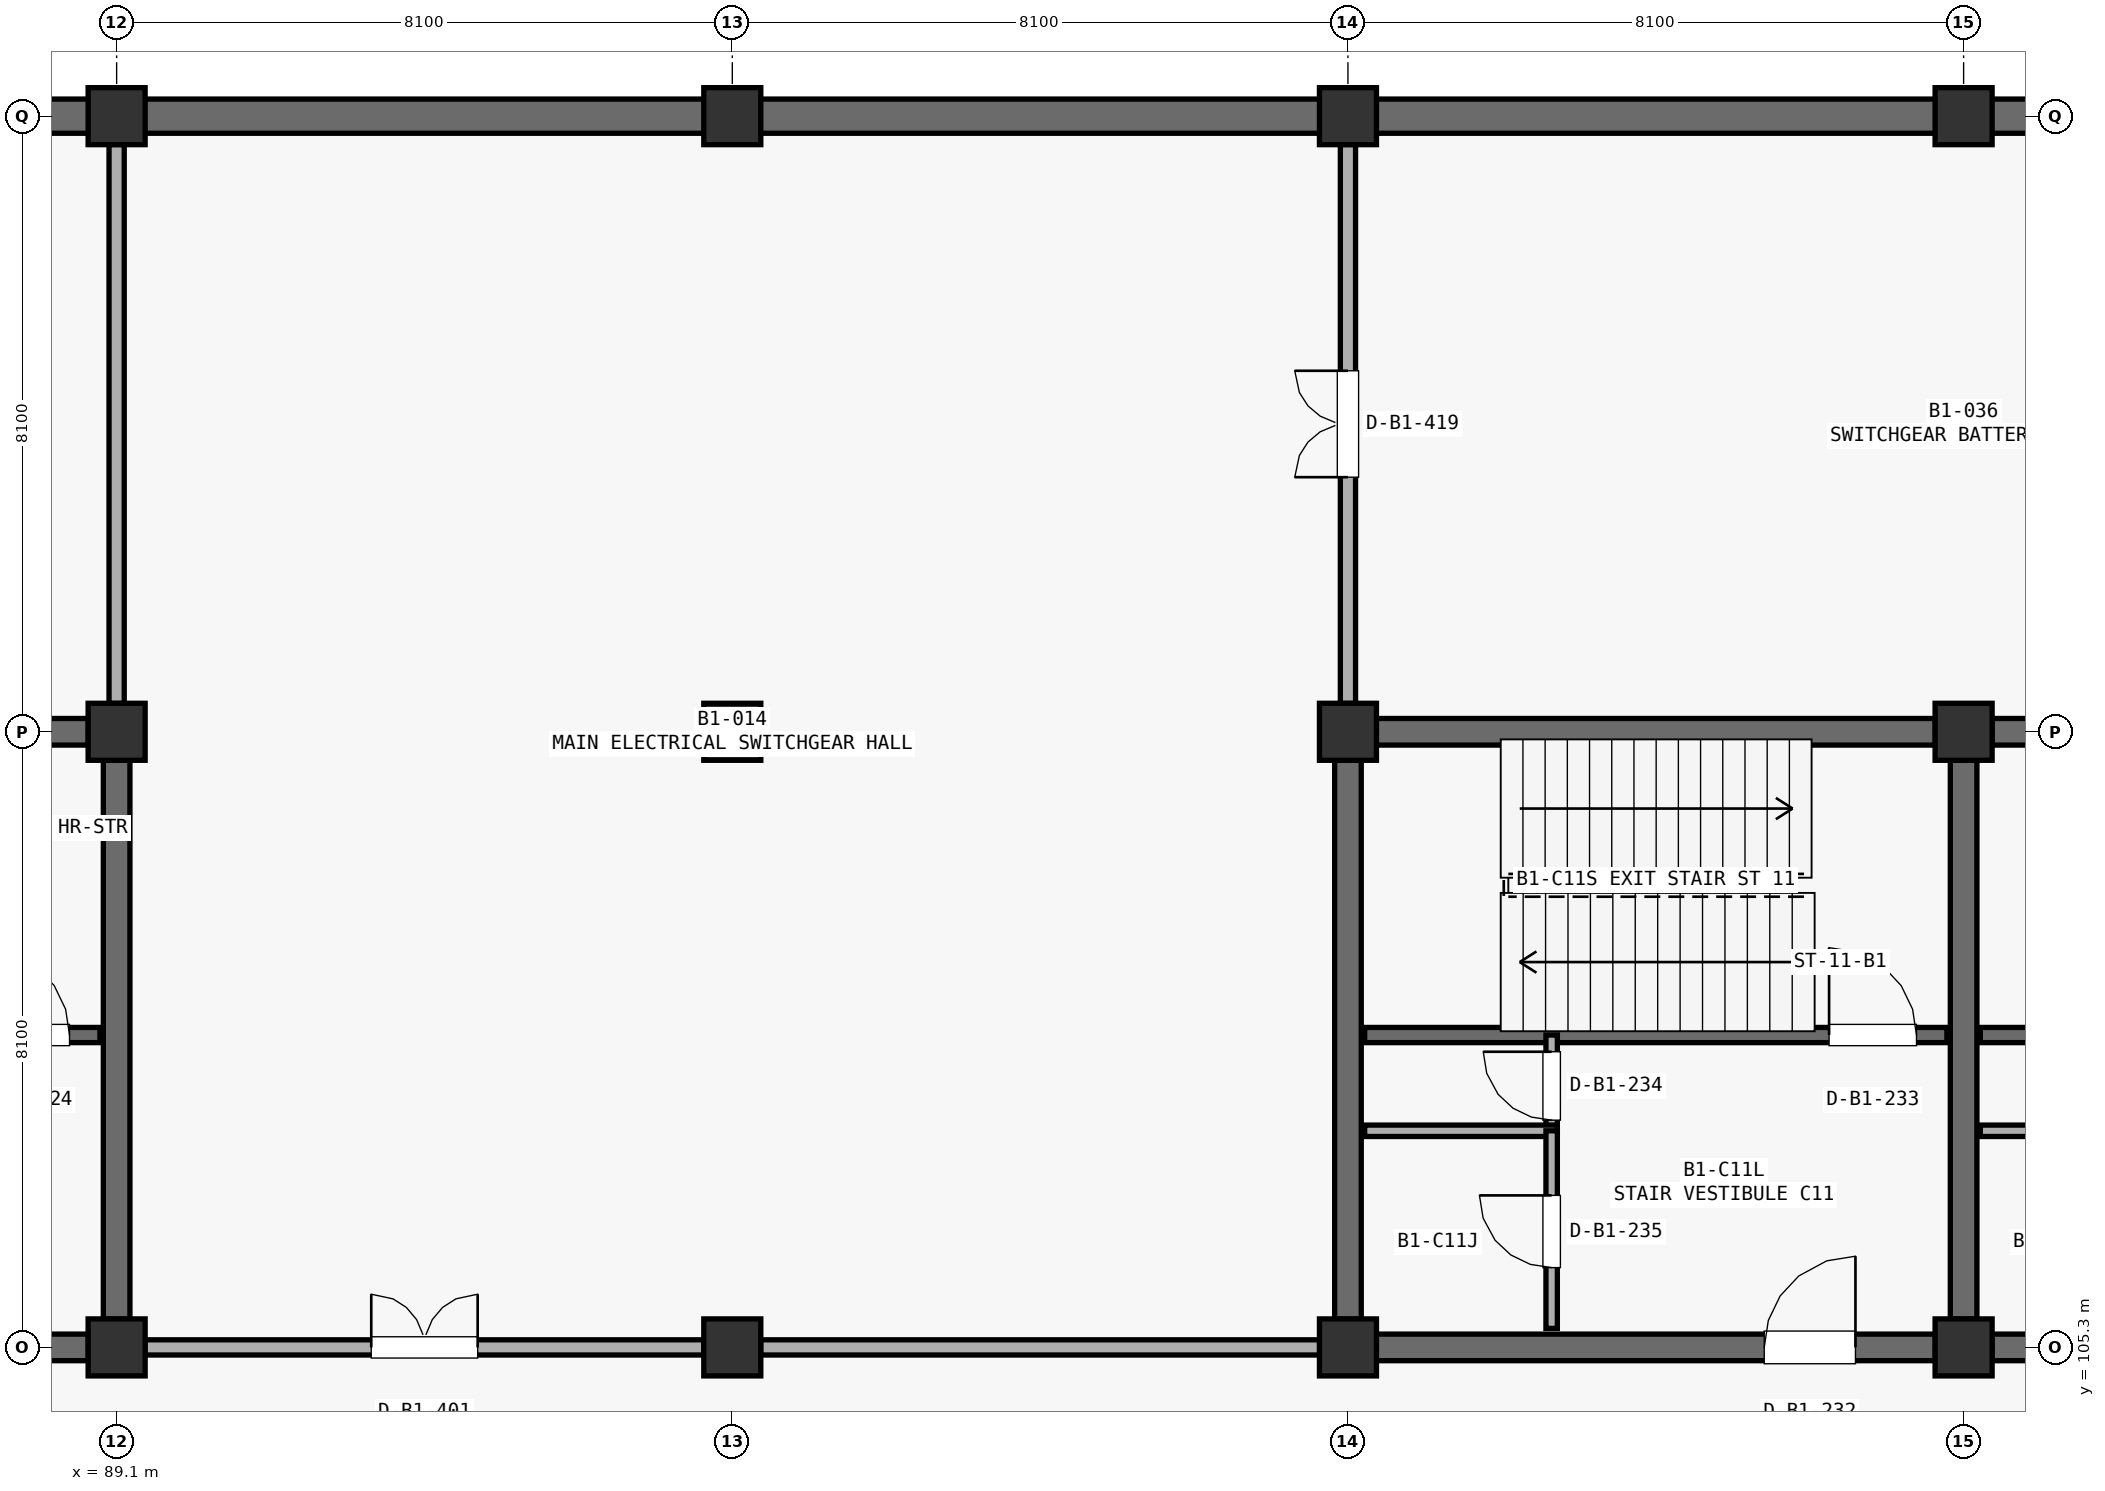
"""IFC4 building model, lengths in metres.
Left out: names, types, materials, properties, quantities, classifications, styles, units other than length and angle.
Written with IfcOpenShell. Run it as: python <this file> out.ifc"""

import sys

from ifc_helpers import new_model, si_unit, direction, frame, frame_2d, origin, origin_2d, place, context, subcontext, project, spatial, rectangle, extrude, element, fill, save


model = new_model("IFC4")
c1 = context("Model", 3, precision=1e-05, world=origin(), true_north=direction((0.0, 1.0)))
c2 = subcontext(c1, "Body", "Model", "MODEL_VIEW")
j1 = project(units=[si_unit("LENGTHUNIT", "METRE"), si_unit("PLANEANGLEUNIT", "RADIAN")], contexts=[c1])
p1 = place(None, origin())
s1 = spatial("IfcSite", under=j1, at=p1, CompositionType="ELEMENT")
p2 = place(p1, origin())
s2 = spatial("IfcBuilding", under=s1, at=p2, CompositionType="ELEMENT")
p3 = place(p2, frame((0.0, 0.0, -5.1)))
s3 = spatial("IfcBuildingStorey", under=s2, at=p3, CompositionType="ELEMENT", Elevation=-5.1)
for number, where, z_axis, x_axis in (
    (1, (89.1, 105.3, 0.0), (0.0, 0.0, 1.0), (1.0, 0.0, 0.0)),
    (2, (89.1, 113.4, 0.0), (0.0, 0.0, 1.0), (1.0, 0.0, 0.0)),
    (3, (89.1, 121.5, 0.0), (0.0, 0.0, 1.0), (1.0, 0.0, 0.0)),
    (4, (97.2, 105.3, 0.0), (0.0, 0.0, 1.0), (1.0, 0.0, 0.0)),
    (5, (97.2, 113.4, 0.0), (0.0, 0.0, 1.0), (1.0, 0.0, 0.0)),
    (6, (97.2, 121.5, 0.0), (0.0, 0.0, 1.0), (1.0, 0.0, 0.0)),
    (7, (105.3, 105.3, 0.0), (0.0, 0.0, 1.0), (1.0, 0.0, 0.0)),
    (8, (105.3, 113.4, 0.0), (0.0, 0.0, 1.0), (1.0, 0.0, 0.0)),
    (9, (105.3, 121.5, 0.0), (0.0, 0.0, 1.0), (1.0, 0.0, 0.0)),
    (10, (113.4, 105.3, 0.0), (0.0, 0.0, 1.0), (1.0, 0.0, 0.0)),
    (11, (113.4, 113.4, 0.0), (0.0, 0.0, 1.0), (1.0, 0.0, 0.0)),
    (12, (113.4, 121.5, 0.0), (0.0, 0.0, 1.0), (1.0, 0.0, 0.0)),
):
    element("IfcColumn", number, at=place(p3, frame(where, z_axis=z_axis, x_axis=x_axis)), inside=s3, PredefinedType="COLUMN", context=c2, shape_type="SweptSolid", body=[
        extrude(rectangle(XDim=0.75, YDim=0.75, at=origin_2d()), origin(), (0.0, 0.0, 1.0), 5.1),
    ])
p4 = place(p3, frame((81.36, 121.5, 0.0), z_axis=(0.0, 0.0, 1.0), x_axis=(1.0, 0.0, 0.0)))
e13 = element("IfcWall", 13, at=p4, inside=s3, PredefinedType="SOLIDWALL", context=c2, shape_type="SweptSolid", body=[
    extrude(rectangle(XDim=7.38, YDim=0.45, at=frame_2d((3.69, 0.0))), origin(), (0.0, 0.0, 1.0), 4.03),
])
p5 = place(p3, frame((89.46, 121.5, 0.0), z_axis=(0.0, 0.0, 1.0), x_axis=(1.0, 0.0, 0.0)))
e14 = element("IfcWall", 14, at=p5, inside=s3, PredefinedType="SOLIDWALL", context=c2, shape_type="SweptSolid", body=[
    extrude(rectangle(XDim=7.38, YDim=0.45, at=frame_2d((3.69, 0.0))), origin(), (0.0, 0.0, 1.0), 4.13),
])
p6 = place(p3, frame((97.56, 121.5, 0.0), z_axis=(0.0, 0.0, 1.0), x_axis=(1.0, 0.0, 0.0)))
e15 = element("IfcWall", 15, at=p6, inside=s3, PredefinedType="SOLIDWALL", context=c2, shape_type="SweptSolid", body=[
    extrude(rectangle(XDim=7.38, YDim=0.45, at=frame_2d((3.69, 0.0))), origin(), (0.0, 0.0, 1.0), 4.13),
])
p7 = place(p3, frame((105.66, 121.5, 0.0), z_axis=(0.0, 0.0, 1.0), x_axis=(1.0, 0.0, 0.0)))
e16 = element("IfcWall", 16, at=p7, inside=s3, PredefinedType="SOLIDWALL", context=c2, shape_type="SweptSolid", body=[
    extrude(rectangle(XDim=7.38, YDim=0.45, at=frame_2d((3.69, 0.0))), origin(), (0.0, 0.0, 1.0), 3.93),
])
p8 = place(p3, frame((113.76, 121.5, 0.0), z_axis=(0.0, 0.0, 1.0), x_axis=(1.0, 0.0, 0.0)))
e17 = element("IfcWall", 17, at=p8, inside=s3, PredefinedType="SOLIDWALL", context=c2, shape_type="SweptSolid", body=[
    extrude(rectangle(XDim=7.38, YDim=0.45, at=frame_2d((3.69, 0.0))), origin(), (0.0, 0.0, 1.0), 3.83),
])
for number, where, z_axis, x_axis in (
    (18, (81.373, 113.4, 0.0), (0.0, 0.0, 1.0), (1.0, 0.0, 0.0)),
    (19, (89.1, 105.673, 0.0), (0.0, 0.0, 1.0), (0.0, 1.0, 0.0)),
):
    element("IfcWall", number, at=place(p3, frame(where, z_axis=z_axis, x_axis=x_axis)), inside=s3, PredefinedType="SHEAR", context=c2, shape_type="SweptSolid", body=[
        extrude(rectangle(XDim=7.354, YDim=0.35, at=frame_2d((3.677, 0.0))), origin(), (0.0, 0.0, 1.0), 4.782),
    ])
p9 = place(p3, frame((81.373, 105.3, 0.0), z_axis=(0.0, 0.0, 1.0), x_axis=(1.0, 0.0, 0.0)))
e20 = element("IfcWall", 20, at=p9, inside=s3, PredefinedType="SHEAR", context=c2, shape_type="SweptSolid", body=[
    extrude(rectangle(XDim=7.354, YDim=0.35, at=frame_2d((3.677, 0.0))), origin(), (0.0, 0.0, 1.0), 4.782),
])
p10 = place(p9, frame((5.104, 0.0, 0.0)))
e21 = element("IfcOpeningElement", 21, at=p10, cuts=e20, PredefinedType="OPENING", context=c2, shape_type="SweptSolid", body=[
    extrude(rectangle(XDim=1.2, YDim=2.2, at=frame_2d((0.6, 1.1))), frame((0.0, 0.185, 0.0), z_axis=(0.0, -1.0, 0.0), x_axis=(1.0, 0.0, 0.0)), (0.0, 0.0, 1.0), 0.37),
])
p11 = place(p3, frame((81.22, 109.41, 0.0), z_axis=(0.0, 0.0, 1.0), x_axis=(1.0, 0.0, 0.0)))
e22 = element("IfcWall", 22, at=p11, inside=s3, PredefinedType="SHEAR", context=c2, shape_type="SweptSolid", body=[
    extrude(rectangle(XDim=7.66, YDim=0.2, at=frame_2d((3.83, 0.0))), origin(), (0.0, 0.0, 1.0), 4.782),
])
p12 = place(p11, frame((6.11, 0.0, 0.0)))
e23 = element("IfcOpeningElement", 23, at=p12, cuts=e22, PredefinedType="OPENING", context=c2, shape_type="SweptSolid", body=[
    extrude(rectangle(XDim=1.15, YDim=2.2, at=frame_2d((0.575, 1.1))), frame((0.0, 0.11, 0.0), z_axis=(0.0, -1.0, 0.0), x_axis=(1.0, 0.0, 0.0)), (0.0, 0.0, 1.0), 0.22),
])
for number, where, z_axis, x_axis in (
    (24, (113.773, 113.4, 0.0), (0.0, 0.0, 1.0), (1.0, 0.0, 0.0)),
    (25, (113.4, 105.673, 0.0), (0.0, 0.0, 1.0), (0.0, 1.0, 0.0)),
):
    element("IfcWall", number, at=place(p3, frame(where, z_axis=z_axis, x_axis=x_axis)), inside=s3, PredefinedType="SHEAR", context=c2, shape_type="SweptSolid", body=[
        extrude(rectangle(XDim=7.354, YDim=0.35, at=frame_2d((3.677, 0.0))), origin(), (0.0, 0.0, 1.0), 4.782),
    ])
p13 = place(p3, frame((113.773, 105.3, 0.0), z_axis=(0.0, 0.0, 1.0), x_axis=(1.0, 0.0, 0.0)))
e26 = element("IfcWall", 26, at=p13, inside=s3, PredefinedType="SHEAR", context=c2, shape_type="SweptSolid", body=[
    extrude(rectangle(XDim=7.354, YDim=0.35, at=frame_2d((3.677, 0.0))), origin(), (0.0, 0.0, 1.0), 4.782),
])
p14 = place(p13, frame((5.104, 0.0, 0.0)))
e27 = element("IfcOpeningElement", 27, at=p14, cuts=e26, PredefinedType="OPENING", context=c2, shape_type="SweptSolid", body=[
    extrude(rectangle(XDim=1.2, YDim=2.2, at=frame_2d((0.6, 1.1))), frame((0.0, 0.185, 0.0), z_axis=(0.0, -1.0, 0.0), x_axis=(1.0, 0.0, 0.0)), (0.0, 0.0, 1.0), 0.37),
])
p15 = place(p3, frame((113.62, 109.41, 0.0), z_axis=(0.0, 0.0, 1.0), x_axis=(1.0, 0.0, 0.0)))
e28 = element("IfcWall", 28, at=p15, inside=s3, PredefinedType="SHEAR", context=c2, shape_type="SweptSolid", body=[
    extrude(rectangle(XDim=7.66, YDim=0.2, at=frame_2d((3.83, 0.0))), origin(), (0.0, 0.0, 1.0), 4.782),
])
p16 = place(p15, frame((6.11, 0.0, 0.0)))
e29 = element("IfcOpeningElement", 29, at=p16, cuts=e28, PredefinedType="OPENING", context=c2, shape_type="SweptSolid", body=[
    extrude(rectangle(XDim=1.15, YDim=2.2, at=frame_2d((0.575, 1.1))), frame((0.0, 0.11, 0.0), z_axis=(0.0, -1.0, 0.0), x_axis=(1.0, 0.0, 0.0)), (0.0, 0.0, 1.0), 0.22),
])
p17 = place(p3, frame((113.62, 108.15, 0.0), z_axis=(0.0, 0.0, 1.0), x_axis=(1.0, 0.0, 0.0)))
e30 = element("IfcWall", 30, at=p17, inside=s3, PredefinedType="PARTITIONING", context=c2, shape_type="SweptSolid", body=[
    extrude(rectangle(XDim=2.53, YDim=0.15, at=frame_2d((1.265, 0.0))), origin(), (0.0, 0.0, 1.0), 4.782),
])
for number, where, z_axis, x_axis in (
    (31, (105.673, 113.4, 0.0), (0.0, 0.0, 1.0), (1.0, 0.0, 0.0)),
    (32, (105.3, 105.673, 0.0), (0.0, 0.0, 1.0), (0.0, 1.0, 0.0)),
):
    element("IfcWall", number, at=place(p3, frame(where, z_axis=z_axis, x_axis=x_axis)), inside=s3, PredefinedType="SHEAR", context=c2, shape_type="SweptSolid", body=[
        extrude(rectangle(XDim=7.354, YDim=0.35, at=frame_2d((3.677, 0.0))), origin(), (0.0, 0.0, 1.0), 4.782),
    ])
p18 = place(p3, frame((105.673, 105.3, 0.0), z_axis=(0.0, 0.0, 1.0), x_axis=(1.0, 0.0, 0.0)))
e33 = element("IfcWall", 33, at=p18, inside=s3, PredefinedType="SHEAR", context=c2, shape_type="SweptSolid", body=[
    extrude(rectangle(XDim=7.354, YDim=0.35, at=frame_2d((3.677, 0.0))), origin(), (0.0, 0.0, 1.0), 4.782),
])
p19 = place(p18, frame((5.104, 0.0, 0.0)))
e34 = element("IfcOpeningElement", 34, at=p19, cuts=e33, PredefinedType="OPENING", context=c2, shape_type="SweptSolid", body=[
    extrude(rectangle(XDim=1.2, YDim=2.2, at=frame_2d((0.6, 1.1))), frame((0.0, 0.185, 0.0), z_axis=(0.0, -1.0, 0.0), x_axis=(1.0, 0.0, 0.0)), (0.0, 0.0, 1.0), 0.37),
])
p20 = place(p3, frame((105.52, 109.41, 0.0), z_axis=(0.0, 0.0, 1.0), x_axis=(1.0, 0.0, 0.0)))
e35 = element("IfcWall", 35, at=p20, inside=s3, PredefinedType="SHEAR", context=c2, shape_type="SweptSolid", body=[
    extrude(rectangle(XDim=7.66, YDim=0.2, at=frame_2d((3.83, 0.0))), origin(), (0.0, 0.0, 1.0), 4.782),
])
p21 = place(p20, frame((6.11, 0.0, 0.0)))
e36 = element("IfcOpeningElement", 36, at=p21, cuts=e35, PredefinedType="OPENING", context=c2, shape_type="SweptSolid", body=[
    extrude(rectangle(XDim=1.15, YDim=2.2, at=frame_2d((0.575, 1.1))), frame((0.0, 0.11, 0.0), z_axis=(0.0, -1.0, 0.0), x_axis=(1.0, 0.0, 0.0)), (0.0, 0.0, 1.0), 0.22),
])
p22 = place(p3, frame((107.98, 108.15, 0.0), z_axis=(0.0, 0.0, 1.0), x_axis=(0.0, 1.0, 0.0)))
e37 = element("IfcWall", 37, at=p22, inside=s3, PredefinedType="PARTITIONING", context=c2, shape_type="SweptSolid", body=[
    extrude(rectangle(XDim=1.26, YDim=0.15, at=frame_2d((0.63, 0.0))), origin(), (0.0, 0.0, 1.0), 4.782),
])
p23 = place(p22, frame((0.14, 0.0, 0.0)))
e38 = element("IfcOpeningElement", 38, at=p23, cuts=e37, PredefinedType="OPENING", context=c2, shape_type="SweptSolid", body=[
    extrude(rectangle(XDim=0.9, YDim=2.15, at=frame_2d((0.45, 1.075))), frame((0.0, 0.085, 0.0), z_axis=(0.0, -1.0, 0.0), x_axis=(1.0, 0.0, 0.0)), (0.0, 0.0, 1.0), 0.17),
])
p24 = place(p3, frame((105.52, 108.15, 0.0), z_axis=(0.0, 0.0, 1.0), x_axis=(1.0, 0.0, 0.0)))
e39 = element("IfcWall", 39, at=p24, inside=s3, PredefinedType="PARTITIONING", context=c2, shape_type="SweptSolid", body=[
    extrude(rectangle(XDim=2.53, YDim=0.15, at=frame_2d((1.265, 0.0))), origin(), (0.0, 0.0, 1.0), 4.782),
])
p25 = place(p3, frame((107.98, 105.55, 0.0), z_axis=(0.0, 0.0, 1.0), x_axis=(0.0, 1.0, 0.0)))
e40 = element("IfcWall", 40, at=p25, inside=s3, PredefinedType="PARTITIONING", context=c2, shape_type="SweptSolid", body=[
    extrude(rectangle(XDim=2.6, YDim=0.15, at=frame_2d((1.3, 0.0))), origin(), (0.0, 0.0, 1.0), 4.782),
])
p26 = place(p25, frame((0.8, 0.0, 0.0)))
e41 = element("IfcOpeningElement", 41, at=p26, cuts=e40, PredefinedType="OPENING", context=c2, shape_type="SweptSolid", body=[
    extrude(rectangle(XDim=0.95, YDim=2.15, at=frame_2d((0.475, 1.075))), frame((0.0, 0.085, 0.0), z_axis=(0.0, -1.0, 0.0), x_axis=(1.0, 0.0, 0.0)), (0.0, 0.0, 1.0), 0.17),
])
p27 = place(p3, frame((89.473, 105.3, 0.0), z_axis=(0.0, 0.0, 1.0), x_axis=(1.0, 0.0, 0.0)))
e42 = element("IfcWall", 42, at=p27, inside=s3, PredefinedType="PARTITIONING", context=c2, shape_type="SweptSolid", body=[
    extrude(rectangle(XDim=7.354, YDim=0.2, at=frame_2d((3.677, 0.0))), origin(), (0.0, 0.0, 1.0), 3.832),
])
p28 = place(p27, frame((2.977, 0.0, 0.0)))
e43 = element("IfcOpeningElement", 43, at=p28, cuts=e42, PredefinedType="OPENING", context=c2, shape_type="SweptSolid", body=[
    extrude(rectangle(XDim=1.4, YDim=2.2, at=frame_2d((0.7, 1.1))), frame((0.0, 0.11, 0.0), z_axis=(0.0, -1.0, 0.0), x_axis=(1.0, 0.0, 0.0)), (0.0, 0.0, 1.0), 0.22),
])
p29 = place(p3, frame((97.573, 105.3, 0.0), z_axis=(0.0, 0.0, 1.0), x_axis=(1.0, 0.0, 0.0)))
e44 = element("IfcWall", 44, at=p29, inside=s3, PredefinedType="PARTITIONING", context=c2, shape_type="SweptSolid", body=[
    extrude(rectangle(XDim=7.354, YDim=0.2, at=frame_2d((3.677, 0.0))), origin(), (0.0, 0.0, 1.0), 4.032),
])
p30 = place(p3, frame((105.3, 113.773, 0.0), z_axis=(0.0, 0.0, 1.0), x_axis=(0.0, 1.0, 0.0)))
e45 = element("IfcWall", 45, at=p30, inside=s3, PredefinedType="PARTITIONING", context=c2, shape_type="SweptSolid", body=[
    extrude(rectangle(XDim=7.354, YDim=0.2, at=frame_2d((3.677, 0.0))), origin(), (0.0, 0.0, 1.0), 4.032),
])
p31 = place(p30, frame((2.977, 0.0, 0.0)))
e46 = element("IfcOpeningElement", 46, at=p31, cuts=e45, PredefinedType="OPENING", context=c2, shape_type="SweptSolid", body=[
    extrude(rectangle(XDim=1.4, YDim=2.2, at=frame_2d((0.7, 1.1))), frame((0.0, 0.11, 0.0), z_axis=(0.0, -1.0, 0.0), x_axis=(1.0, 0.0, 0.0)), (0.0, 0.0, 1.0), 0.22),
])
p32 = place(p3, frame((89.1, 113.773, 0.0), z_axis=(0.0, 0.0, 1.0), x_axis=(0.0, 1.0, 0.0)))
e47 = element("IfcWall", 47, at=p32, inside=s3, PredefinedType="PARTITIONING", context=c2, shape_type="SweptSolid", body=[
    extrude(rectangle(XDim=7.354, YDim=0.2, at=frame_2d((3.677, 0.0))), origin(), (0.0, 0.0, 1.0), 4.132),
])
p33 = place(p12, origin())
e48 = element("IfcDoor", 48, at=p33, inside=s3, OperationType="SINGLE_SWING_LEFT", PredefinedType="DOOR", context=c2, shape_type="SweptSolid", body=[
    extrude(rectangle(XDim=1.15, YDim=2.2, at=frame_2d((0.575, 1.1))), frame((0.0, 0.025, 0.0), z_axis=(0.0, -1.0, 0.0), x_axis=(1.0, 0.0, 0.0)), (0.0, 0.0, 1.0), 0.05),
])
fill(e23, e48)
p34 = place(p19, origin())
e49 = element("IfcDoor", 49, at=p34, inside=s3, OperationType="SINGLE_SWING_RIGHT", PredefinedType="DOOR", context=c2, shape_type="SweptSolid", body=[
    extrude(rectangle(XDim=1.2, YDim=2.2, at=frame_2d((0.6, 1.1))), frame((0.0, 0.025, 0.0), z_axis=(0.0, -1.0, 0.0), x_axis=(1.0, 0.0, 0.0)), (0.0, 0.0, 1.0), 0.05),
])
fill(e34, e49)
p35 = place(p21, origin())
e50 = element("IfcDoor", 50, at=p35, inside=s3, OperationType="SINGLE_SWING_LEFT", PredefinedType="DOOR", context=c2, shape_type="SweptSolid", body=[
    extrude(rectangle(XDim=1.15, YDim=2.2, at=frame_2d((0.575, 1.1))), frame((0.0, 0.025, 0.0), z_axis=(0.0, -1.0, 0.0), x_axis=(1.0, 0.0, 0.0)), (0.0, 0.0, 1.0), 0.05),
])
fill(e36, e50)
p36 = place(p23, origin())
e51 = element("IfcDoor", 51, at=p36, inside=s3, OperationType="SINGLE_SWING_RIGHT", PredefinedType="DOOR", context=c2, shape_type="SweptSolid", body=[
    extrude(rectangle(XDim=0.9, YDim=2.15, at=frame_2d((0.45, 1.075))), frame((0.0, 0.025, 0.0), z_axis=(0.0, -1.0, 0.0), x_axis=(1.0, 0.0, 0.0)), (0.0, 0.0, 1.0), 0.05),
])
fill(e38, e51)
p37 = place(p26, origin())
e52 = element("IfcDoor", 52, at=p37, inside=s3, OperationType="SINGLE_SWING_RIGHT", PredefinedType="DOOR", context=c2, shape_type="SweptSolid", body=[
    extrude(rectangle(XDim=0.95, YDim=2.15, at=frame_2d((0.475, 1.075))), frame((0.0, 0.025, 0.0), z_axis=(0.0, -1.0, 0.0), x_axis=(1.0, 0.0, 0.0)), (0.0, 0.0, 1.0), 0.05),
])
fill(e41, e52)
p38 = place(p28, origin())
e53 = element("IfcDoor", 53, at=p38, inside=s3, OperationType="DOUBLE_SWING_LEFT", PredefinedType="DOOR", context=c2, shape_type="SweptSolid", body=[
    extrude(rectangle(XDim=1.4, YDim=2.2, at=frame_2d((0.7, 1.1))), frame((0.0, 0.025, 0.0), z_axis=(0.0, -1.0, 0.0), x_axis=(1.0, 0.0, 0.0)), (0.0, 0.0, 1.0), 0.05),
])
fill(e43, e53)
p39 = place(p31, origin())
e54 = element("IfcDoor", 54, at=p39, inside=s3, OperationType="DOUBLE_SWING_LEFT", PredefinedType="DOOR", context=c2, shape_type="SweptSolid", body=[
    extrude(rectangle(XDim=1.4, YDim=2.2, at=frame_2d((0.7, 1.1))), frame((0.0, 0.025, 0.0), z_axis=(0.0, -1.0, 0.0), x_axis=(1.0, 0.0, 0.0)), (0.0, 0.0, 1.0), 0.05),
])
fill(e46, e54)
save(model, sys.argv[1])
